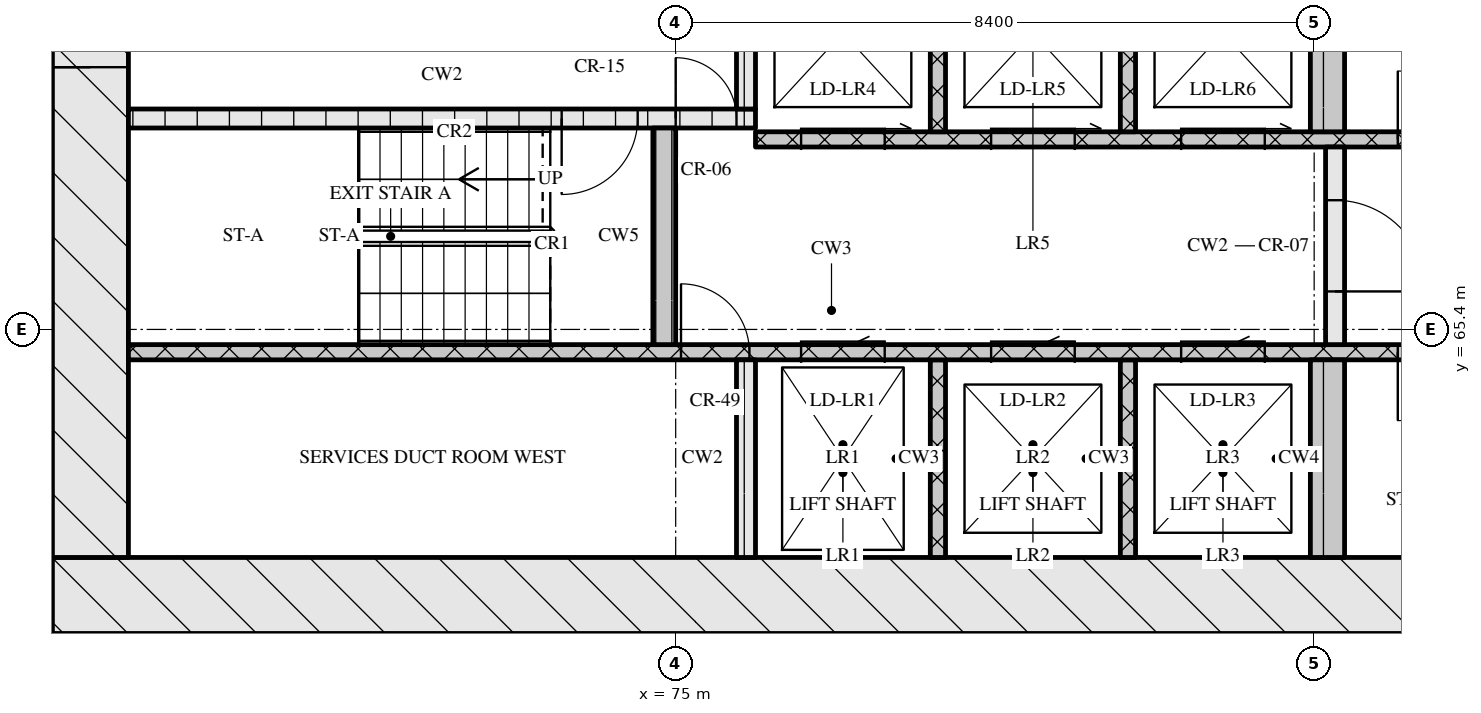
"""IFC4 building model, lengths in metres.
Left out: names, types, materials, properties, quantities, classifications, styles, units other than length and angle.
Written with IfcOpenShell. Run it as: python <this file> out.ifc"""

import sys

from ifc_helpers import new_model, si_unit, direction, frame, frame_2d, origin, place, context, subcontext, project, spatial, rectangle, extrude, element, fill, save


model = new_model("IFC4")
c1 = context("Model", 3, precision=1e-05, world=origin(), true_north=direction((0.0, 1.0)))
c2 = subcontext(c1, "Body", "Model", "MODEL_VIEW")
j1 = project(units=[si_unit("LENGTHUNIT", "METRE"), si_unit("PLANEANGLEUNIT", "RADIAN")], contexts=[c1])
p1 = place(None, origin())
s1 = spatial("IfcSite", under=j1, at=p1, CompositionType="ELEMENT")
p2 = place(p1, origin())
s2 = spatial("IfcBuilding", under=s1, at=p2, CompositionType="ELEMENT")
p3 = place(p2, frame((0.0, 0.0, 124.05)))
s3 = spatial("IfcBuildingStorey", under=s2, at=p3, CompositionType="ELEMENT", Elevation=124.05)
p4 = place(p3, frame((66.8, 61.9, 0.0), z_axis=(0.0, 0.0, 1.0), x_axis=(1.0, 0.0, 0.0)))
e1 = element("IfcWall", 1, at=p4, inside=s3, PredefinedType="SOLIDWALL", context=c2, shape_type="SweptSolid", body=[
    extrude(rectangle(XDim=41.6, YDim=1.0, at=frame_2d((20.8, 0.0))), origin(), (0.0, 0.0, 1.0), 3.32),
])
p5 = place(p4, frame((21.15, 0.0, 0.0)))
e2 = element("IfcOpeningElement", 2, at=p5, cuts=e1, PredefinedType="OPENING", context=c2, shape_type="SweptSolid", body=[
    extrude(rectangle(XDim=1.8, YDim=2.1, at=frame_2d((0.9, 1.05))), frame((0.0, 0.51, 0.0), z_axis=(0.0, -1.0, 0.0), x_axis=(1.0, 0.0, 0.0)), (0.0, 0.0, 1.0), 1.02),
])
p6 = place(p3, frame((67.3, 62.4, 0.0), z_axis=(0.0, 0.0, 1.0), x_axis=(0.0, 1.0, 0.0)))
e3 = element("IfcWall", 3, at=p6, inside=s3, PredefinedType="SOLIDWALL", context=c2, shape_type="SweptSolid", body=[
    extrude(rectangle(XDim=12.0, YDim=1.0, at=frame_2d((6.0, 0.0))), origin(), (0.0, 0.0, 1.0), 3.32),
])
p7 = place(p6, frame((6.45, 0.0, 0.0)))
e4 = element("IfcOpeningElement", 4, at=p7, cuts=e3, PredefinedType="OPENING", context=c2, shape_type="SweptSolid", body=[
    extrude(rectangle(XDim=1.2, YDim=2.1, at=frame_2d((0.6, 1.05))), frame((0.0, 0.51, 0.0), z_axis=(0.0, -1.0, 0.0), x_axis=(1.0, 0.0, 0.0)), (0.0, 0.0, 1.0), 1.02),
])
p8 = place(p3, frame((75.925, 62.4, 0.0), z_axis=(0.0, 0.0, 1.0), x_axis=(0.0, 1.0, 0.0)))
e5 = element("IfcWall", 5, at=p8, inside=s3, PredefinedType="SOLIDWALL", context=c2, shape_type="SweptSolid", body=[
    extrude(rectangle(XDim=2.6, YDim=0.25, at=frame_2d((1.3, 0.0))), origin(), (0.0, 0.0, 1.0), 3.32),
])
for number, where, z_axis, x_axis in (
    (6, (78.45, 62.4, 0.0), (0.0, 0.0, 1.0), (0.0, 1.0, 0.0)),
    (7, (80.95, 62.4, 0.0), (0.0, 0.0, 1.0), (0.0, 1.0, 0.0)),
):
    element("IfcWall", number, at=place(p3, frame(where, z_axis=z_axis, x_axis=x_axis)), inside=s3, PredefinedType="SOLIDWALL", context=c2, shape_type="SweptSolid", body=[
        extrude(rectangle(XDim=2.6, YDim=0.2, at=frame_2d((1.3, 0.0))), origin(), (0.0, 0.0, 1.0), 3.32),
    ])
p9 = place(p3, frame((83.575, 62.4, 0.0), z_axis=(0.0, 0.0, 1.0), x_axis=(0.0, 1.0, 0.0)))
e8 = element("IfcWall", 8, at=p9, inside=s3, PredefinedType="SOLIDWALL", context=c2, shape_type="SweptSolid", body=[
    extrude(rectangle(XDim=2.6, YDim=0.45, at=frame_2d((1.3, 0.0))), origin(), (0.0, 0.0, 1.0), 3.32),
])
p10 = place(p3, frame((67.8, 65.1, 0.0), z_axis=(0.0, 0.0, 1.0), x_axis=(1.0, 0.0, 0.0)))
e9 = element("IfcWall", 9, at=p10, inside=s3, PredefinedType="SOLIDWALL", context=c2, shape_type="SweptSolid", body=[
    extrude(rectangle(XDim=18.5, YDim=0.2, at=frame_2d((9.25, 0.0))), origin(), (0.0, 0.0, 1.0), 3.32),
])
p11 = place(p10, frame((7.27, 0.0, 0.0)))
e10 = element("IfcOpeningElement", 10, at=p11, cuts=e9, PredefinedType="OPENING", context=c2, shape_type="SweptSolid", body=[
    extrude(rectangle(XDim=0.9, YDim=2.1, at=frame_2d((0.45, 1.05))), frame((0.0, 0.11, 0.0), z_axis=(0.0, -1.0, 0.0), x_axis=(1.0, 0.0, 0.0)), (0.0, 0.0, 1.0), 0.22),
])
p12 = place(p10, frame((8.85, 0.0, 0.0)))
e11 = element("IfcOpeningElement", 11, at=p12, cuts=e9, PredefinedType="OPENING", context=c2, shape_type="SweptSolid", body=[
    extrude(rectangle(XDim=1.1, YDim=2.1, at=frame_2d((0.55, 1.05))), frame((0.0, 0.11, 0.0), z_axis=(0.0, -1.0, 0.0), x_axis=(1.0, 0.0, 0.0)), (0.0, 0.0, 1.0), 0.22),
])
p13 = place(p10, frame((11.35, 0.0, 0.0)))
e12 = element("IfcOpeningElement", 12, at=p13, cuts=e9, PredefinedType="OPENING", context=c2, shape_type="SweptSolid", body=[
    extrude(rectangle(XDim=1.1, YDim=2.1, at=frame_2d((0.55, 1.05))), frame((0.0, 0.11, 0.0), z_axis=(0.0, -1.0, 0.0), x_axis=(1.0, 0.0, 0.0)), (0.0, 0.0, 1.0), 0.22),
])
p14 = place(p10, frame((13.85, 0.0, 0.0)))
e13 = element("IfcOpeningElement", 13, at=p14, cuts=e9, PredefinedType="OPENING", context=c2, shape_type="SweptSolid", body=[
    extrude(rectangle(XDim=1.1, YDim=2.1, at=frame_2d((0.55, 1.05))), frame((0.0, 0.11, 0.0), z_axis=(0.0, -1.0, 0.0), x_axis=(1.0, 0.0, 0.0)), (0.0, 0.0, 1.0), 0.22),
])
p15 = place(p10, frame((16.7, 0.0, 0.0)))
e14 = element("IfcOpeningElement", 14, at=p15, cuts=e9, PredefinedType="OPENING", context=c2, shape_type="SweptSolid", body=[
    extrude(rectangle(XDim=0.9, YDim=2.1, at=frame_2d((0.45, 1.05))), frame((0.0, 0.11, 0.0), z_axis=(0.0, -1.0, 0.0), x_axis=(1.0, 0.0, 0.0)), (0.0, 0.0, 1.0), 0.22),
])
p16 = place(p3, frame((74.85, 65.2, 0.0), z_axis=(0.0, 0.0, 1.0), x_axis=(0.0, 1.0, 0.0)))
e15 = element("IfcWall", 15, at=p16, inside=s3, PredefinedType="SOLIDWALL", context=c2, shape_type="SweptSolid", body=[
    extrude(rectangle(XDim=2.85, YDim=0.3, at=frame_2d((1.425, 0.0))), origin(), (0.0, 0.0, 1.0), 3.32),
])
p17 = place(p3, frame((83.675, 65.2, 0.0), z_axis=(0.0, 0.0, 1.0), x_axis=(0.0, 1.0, 0.0)))
e16 = element("IfcWall", 16, at=p17, inside=s3, PredefinedType="SOLIDWALL", context=c2, shape_type="SweptSolid", body=[
    extrude(rectangle(XDim=2.6, YDim=0.25, at=frame_2d((1.3, 0.0))), origin(), (0.0, 0.0, 1.0), 3.32),
])
p18 = place(p17, frame((0.7, 0.0, 0.0)))
e17 = element("IfcOpeningElement", 17, at=p18, cuts=e16, PredefinedType="OPENING", context=c2, shape_type="SweptSolid", body=[
    extrude(rectangle(XDim=1.2, YDim=2.1, at=frame_2d((0.6, 1.05))), frame((0.0, 0.135, 0.0), z_axis=(0.0, -1.0, 0.0), x_axis=(1.0, 0.0, 0.0)), (0.0, 0.0, 1.0), 0.27),
])
p19 = place(p3, frame((76.05, 67.9, 0.0), z_axis=(0.0, 0.0, 1.0), x_axis=(1.0, 0.0, 0.0)))
e18 = element("IfcWall", 18, at=p19, inside=s3, PredefinedType="SOLIDWALL", context=c2, shape_type="SweptSolid", body=[
    extrude(rectangle(XDim=23.1, YDim=0.2, at=frame_2d((11.55, 0.0))), origin(), (0.0, 0.0, 1.0), 3.32),
])
p20 = place(p19, frame((0.6, 0.0, 0.0)))
e19 = element("IfcOpeningElement", 19, at=p20, cuts=e18, PredefinedType="OPENING", context=c2, shape_type="SweptSolid", body=[
    extrude(rectangle(XDim=1.1, YDim=2.1, at=frame_2d((0.55, 1.05))), frame((0.0, 0.11, 0.0), z_axis=(0.0, -1.0, 0.0), x_axis=(1.0, 0.0, 0.0)), (0.0, 0.0, 1.0), 0.22),
])
p21 = place(p19, frame((3.1, 0.0, 0.0)))
e20 = element("IfcOpeningElement", 20, at=p21, cuts=e18, PredefinedType="OPENING", context=c2, shape_type="SweptSolid", body=[
    extrude(rectangle(XDim=1.1, YDim=2.1, at=frame_2d((0.55, 1.05))), frame((0.0, 0.11, 0.0), z_axis=(0.0, -1.0, 0.0), x_axis=(1.0, 0.0, 0.0)), (0.0, 0.0, 1.0), 0.22),
])
p22 = place(p19, frame((5.6, 0.0, 0.0)))
e21 = element("IfcOpeningElement", 21, at=p22, cuts=e18, PredefinedType="OPENING", context=c2, shape_type="SweptSolid", body=[
    extrude(rectangle(XDim=1.1, YDim=2.1, at=frame_2d((0.55, 1.05))), frame((0.0, 0.11, 0.0), z_axis=(0.0, -1.0, 0.0), x_axis=(1.0, 0.0, 0.0)), (0.0, 0.0, 1.0), 0.22),
])
p23 = place(p19, frame((8.45, 0.0, 0.0)))
e22 = element("IfcOpeningElement", 22, at=p23, cuts=e18, PredefinedType="OPENING", context=c2, shape_type="SweptSolid", body=[
    extrude(rectangle(XDim=0.9, YDim=2.1, at=frame_2d((0.45, 1.05))), frame((0.0, 0.11, 0.0), z_axis=(0.0, -1.0, 0.0), x_axis=(1.0, 0.0, 0.0)), (0.0, 0.0, 1.0), 0.22),
])
p24 = place(p19, frame((10.91, 0.0, 0.0)))
e23 = element("IfcOpeningElement", 23, at=p24, cuts=e18, PredefinedType="OPENING", context=c2, shape_type="SweptSolid", body=[
    extrude(rectangle(XDim=0.9, YDim=2.1, at=frame_2d((0.45, 1.05))), frame((0.0, 0.11, 0.0), z_axis=(0.0, -1.0, 0.0), x_axis=(1.0, 0.0, 0.0)), (0.0, 0.0, 1.0), 0.22),
])
p25 = place(p19, frame((13.55, 0.0, 0.0)))
e24 = element("IfcOpeningElement", 24, at=p25, cuts=e18, PredefinedType="OPENING", context=c2, shape_type="SweptSolid", body=[
    extrude(rectangle(XDim=1.0, YDim=2.1, at=frame_2d((0.5, 1.05))), frame((0.0, 0.11, 0.0), z_axis=(0.0, -1.0, 0.0), x_axis=(1.0, 0.0, 0.0)), (0.0, 0.0, 1.0), 0.22),
])
for number, where, z_axis, x_axis in (
    (25, (78.45, 68.0, 0.0), (0.0, 0.0, 1.0), (0.0, 1.0, 0.0)),
    (26, (80.95, 68.0, 0.0), (0.0, 0.0, 1.0), (0.0, 1.0, 0.0)),
):
    element("IfcWall", number, at=place(p3, frame(where, z_axis=z_axis, x_axis=x_axis)), inside=s3, PredefinedType="SOLIDWALL", context=c2, shape_type="SweptSolid", body=[
        extrude(rectangle(XDim=2.6, YDim=0.2, at=frame_2d((1.3, 0.0))), origin(), (0.0, 0.0, 1.0), 3.32),
    ])
p26 = place(p3, frame((83.575, 68.0, 0.0), z_axis=(0.0, 0.0, 1.0), x_axis=(0.0, 1.0, 0.0)))
e27 = element("IfcWall", 27, at=p26, inside=s3, PredefinedType="SOLIDWALL", context=c2, shape_type="SweptSolid", body=[
    extrude(rectangle(XDim=2.6, YDim=0.45, at=frame_2d((1.3, 0.0))), origin(), (0.0, 0.0, 1.0), 3.32),
])
p27 = place(p3, frame((67.8, 68.175, 0.0), z_axis=(0.0, 0.0, 1.0), x_axis=(1.0, 0.0, 0.0)))
e28 = element("IfcWall", 28, at=p27, inside=s3, PredefinedType="SOLIDWALL", context=c2, shape_type="SweptSolid", body=[
    extrude(rectangle(XDim=8.25, YDim=0.25, at=frame_2d((4.125, 0.0))), origin(), (0.0, 0.0, 1.0), 3.32),
])
p28 = place(p27, frame((5.7, 0.0, 0.0)))
e29 = element("IfcOpeningElement", 29, at=p28, cuts=e28, PredefinedType="OPENING", context=c2, shape_type="SweptSolid", body=[
    extrude(rectangle(XDim=1.0, YDim=2.1, at=frame_2d((0.5, 1.05))), frame((0.0, 0.135, 0.0), z_axis=(0.0, -1.0, 0.0), x_axis=(1.0, 0.0, 0.0)), (0.0, 0.0, 1.0), 0.27),
])
p29 = place(p27, frame((7.2, 0.0, 0.0)))
e30 = element("IfcOpeningElement", 30, at=p29, cuts=e28, PredefinedType="OPENING", context=c2, shape_type="SweptSolid", body=[
    extrude(rectangle(XDim=0.8, YDim=2.1, at=frame_2d((0.4, 1.05))), frame((0.0, 0.135, 0.0), z_axis=(0.0, -1.0, 0.0), x_axis=(1.0, 0.0, 0.0)), (0.0, 0.0, 1.0), 0.27),
])
p30 = place(p3, frame((75.925, 68.3, 0.0), z_axis=(0.0, 0.0, 1.0), x_axis=(0.0, 1.0, 0.0)))
e31 = element("IfcWall", 31, at=p30, inside=s3, PredefinedType="SOLIDWALL", context=c2, shape_type="SweptSolid", body=[
    extrude(rectangle(XDim=2.3, YDim=0.25, at=frame_2d((1.15, 0.0))), origin(), (0.0, 0.0, 1.0), 3.32),
])
p31 = place(p11, origin())
e32 = element("IfcDoor", 32, at=p31, inside=s3, OperationType="SINGLE_SWING_LEFT", PredefinedType="DOOR", context=c2, shape_type="SweptSolid", body=[
    extrude(rectangle(XDim=0.9, YDim=2.1, at=frame_2d((0.45, 1.05))), frame((0.0, 0.025, 0.0), z_axis=(0.0, -1.0, 0.0), x_axis=(1.0, 0.0, 0.0)), (0.0, 0.0, 1.0), 0.05),
])
fill(e10, e32)
p32 = place(p12, origin())
e33 = element("IfcDoor", 33, at=p32, inside=s3, OperationType="SLIDING_TO_LEFT", PredefinedType="DOOR", context=c2, shape_type="SweptSolid", body=[
    extrude(rectangle(XDim=1.1, YDim=2.1, at=frame_2d((0.55, 1.05))), frame((0.0, 0.025, 0.0), z_axis=(0.0, -1.0, 0.0), x_axis=(1.0, 0.0, 0.0)), (0.0, 0.0, 1.0), 0.05),
])
fill(e11, e33)
p33 = place(p13, origin())
e34 = element("IfcDoor", 34, at=p33, inside=s3, OperationType="SLIDING_TO_LEFT", PredefinedType="DOOR", context=c2, shape_type="SweptSolid", body=[
    extrude(rectangle(XDim=1.1, YDim=2.1, at=frame_2d((0.55, 1.05))), frame((0.0, 0.025, 0.0), z_axis=(0.0, -1.0, 0.0), x_axis=(1.0, 0.0, 0.0)), (0.0, 0.0, 1.0), 0.05),
])
fill(e12, e34)
p34 = place(p14, origin())
e35 = element("IfcDoor", 35, at=p34, inside=s3, OperationType="SLIDING_TO_LEFT", PredefinedType="DOOR", context=c2, shape_type="SweptSolid", body=[
    extrude(rectangle(XDim=1.1, YDim=2.1, at=frame_2d((0.55, 1.05))), frame((0.0, 0.025, 0.0), z_axis=(0.0, -1.0, 0.0), x_axis=(1.0, 0.0, 0.0)), (0.0, 0.0, 1.0), 0.05),
])
fill(e13, e35)
p35 = place(p15, origin())
e36 = element("IfcDoor", 36, at=p35, inside=s3, OperationType="SINGLE_SWING_RIGHT", PredefinedType="DOOR", context=c2, shape_type="SweptSolid", body=[
    extrude(rectangle(XDim=0.9, YDim=2.1, at=frame_2d((0.45, 1.05))), frame((0.0, 0.025, 0.0), z_axis=(0.0, -1.0, 0.0), x_axis=(1.0, 0.0, 0.0)), (0.0, 0.0, 1.0), 0.05),
])
fill(e14, e36)
p36 = place(p18, origin())
e37 = element("IfcDoor", 37, at=p36, inside=s3, OperationType="SINGLE_SWING_RIGHT", PredefinedType="DOOR", context=c2, shape_type="SweptSolid", body=[
    extrude(rectangle(XDim=1.2, YDim=2.1, at=frame_2d((0.6, 1.05))), frame((0.0, 0.025, 0.0), z_axis=(0.0, -1.0, 0.0), x_axis=(1.0, 0.0, 0.0)), (0.0, 0.0, 1.0), 0.05),
])
fill(e17, e37)
p37 = place(p20, origin())
e38 = element("IfcDoor", 38, at=p37, inside=s3, OperationType="SLIDING_TO_RIGHT", PredefinedType="DOOR", context=c2, shape_type="SweptSolid", body=[
    extrude(rectangle(XDim=1.1, YDim=2.1, at=frame_2d((0.55, 1.05))), frame((0.0, 0.025, 0.0), z_axis=(0.0, -1.0, 0.0), x_axis=(1.0, 0.0, 0.0)), (0.0, 0.0, 1.0), 0.05),
])
fill(e19, e38)
p38 = place(p21, origin())
e39 = element("IfcDoor", 39, at=p38, inside=s3, OperationType="SLIDING_TO_RIGHT", PredefinedType="DOOR", context=c2, shape_type="SweptSolid", body=[
    extrude(rectangle(XDim=1.1, YDim=2.1, at=frame_2d((0.55, 1.05))), frame((0.0, 0.025, 0.0), z_axis=(0.0, -1.0, 0.0), x_axis=(1.0, 0.0, 0.0)), (0.0, 0.0, 1.0), 0.05),
])
fill(e20, e39)
p39 = place(p22, origin())
e40 = element("IfcDoor", 40, at=p39, inside=s3, OperationType="SLIDING_TO_RIGHT", PredefinedType="DOOR", context=c2, shape_type="SweptSolid", body=[
    extrude(rectangle(XDim=1.1, YDim=2.1, at=frame_2d((0.55, 1.05))), frame((0.0, 0.025, 0.0), z_axis=(0.0, -1.0, 0.0), x_axis=(1.0, 0.0, 0.0)), (0.0, 0.0, 1.0), 0.05),
])
fill(e21, e40)
p40 = place(p23, origin())
e41 = element("IfcDoor", 41, at=p40, inside=s3, OperationType="SINGLE_SWING_LEFT", PredefinedType="DOOR", context=c2, shape_type="SweptSolid", body=[
    extrude(rectangle(XDim=0.9, YDim=2.1, at=frame_2d((0.45, 1.05))), frame((0.0, 0.025, 0.0), z_axis=(0.0, -1.0, 0.0), x_axis=(1.0, 0.0, 0.0)), (0.0, 0.0, 1.0), 0.05),
])
fill(e22, e41)
p41 = place(p28, origin())
e42 = element("IfcDoor", 42, at=p41, inside=s3, OperationType="SINGLE_SWING_RIGHT", PredefinedType="DOOR", context=c2, shape_type="SweptSolid", body=[
    extrude(rectangle(XDim=1.0, YDim=2.1, at=frame_2d((0.5, 1.05))), frame((0.0, 0.025, 0.0), z_axis=(0.0, -1.0, 0.0), x_axis=(1.0, 0.0, 0.0)), (0.0, 0.0, 1.0), 0.05),
])
fill(e29, e42)
p42 = place(p29, origin())
e43 = element("IfcDoor", 43, at=p42, inside=s3, OperationType="SINGLE_SWING_LEFT", PredefinedType="DOOR", context=c2, shape_type="SweptSolid", body=[
    extrude(rectangle(XDim=0.8, YDim=2.1, at=frame_2d((0.4, 1.05))), frame((0.0, 0.025, 0.0), z_axis=(0.0, -1.0, 0.0), x_axis=(1.0, 0.0, 0.0)), (0.0, 0.0, 1.0), 0.05),
])
fill(e30, e43)
p43 = place(p7, origin())
e44 = element("IfcDoor", 44, at=p43, inside=s3, OperationType="SINGLE_SWING_LEFT", PredefinedType="DOOR", context=c2, shape_type="SweptSolid", body=[
    extrude(rectangle(XDim=1.2, YDim=2.1, at=frame_2d((0.6, 1.05))), frame((0.0, 0.025, 0.0), z_axis=(0.0, -1.0, 0.0), x_axis=(1.0, 0.0, 0.0)), (0.0, 0.0, 1.0), 0.05),
])
fill(e4, e44)
save(model, sys.argv[1])
